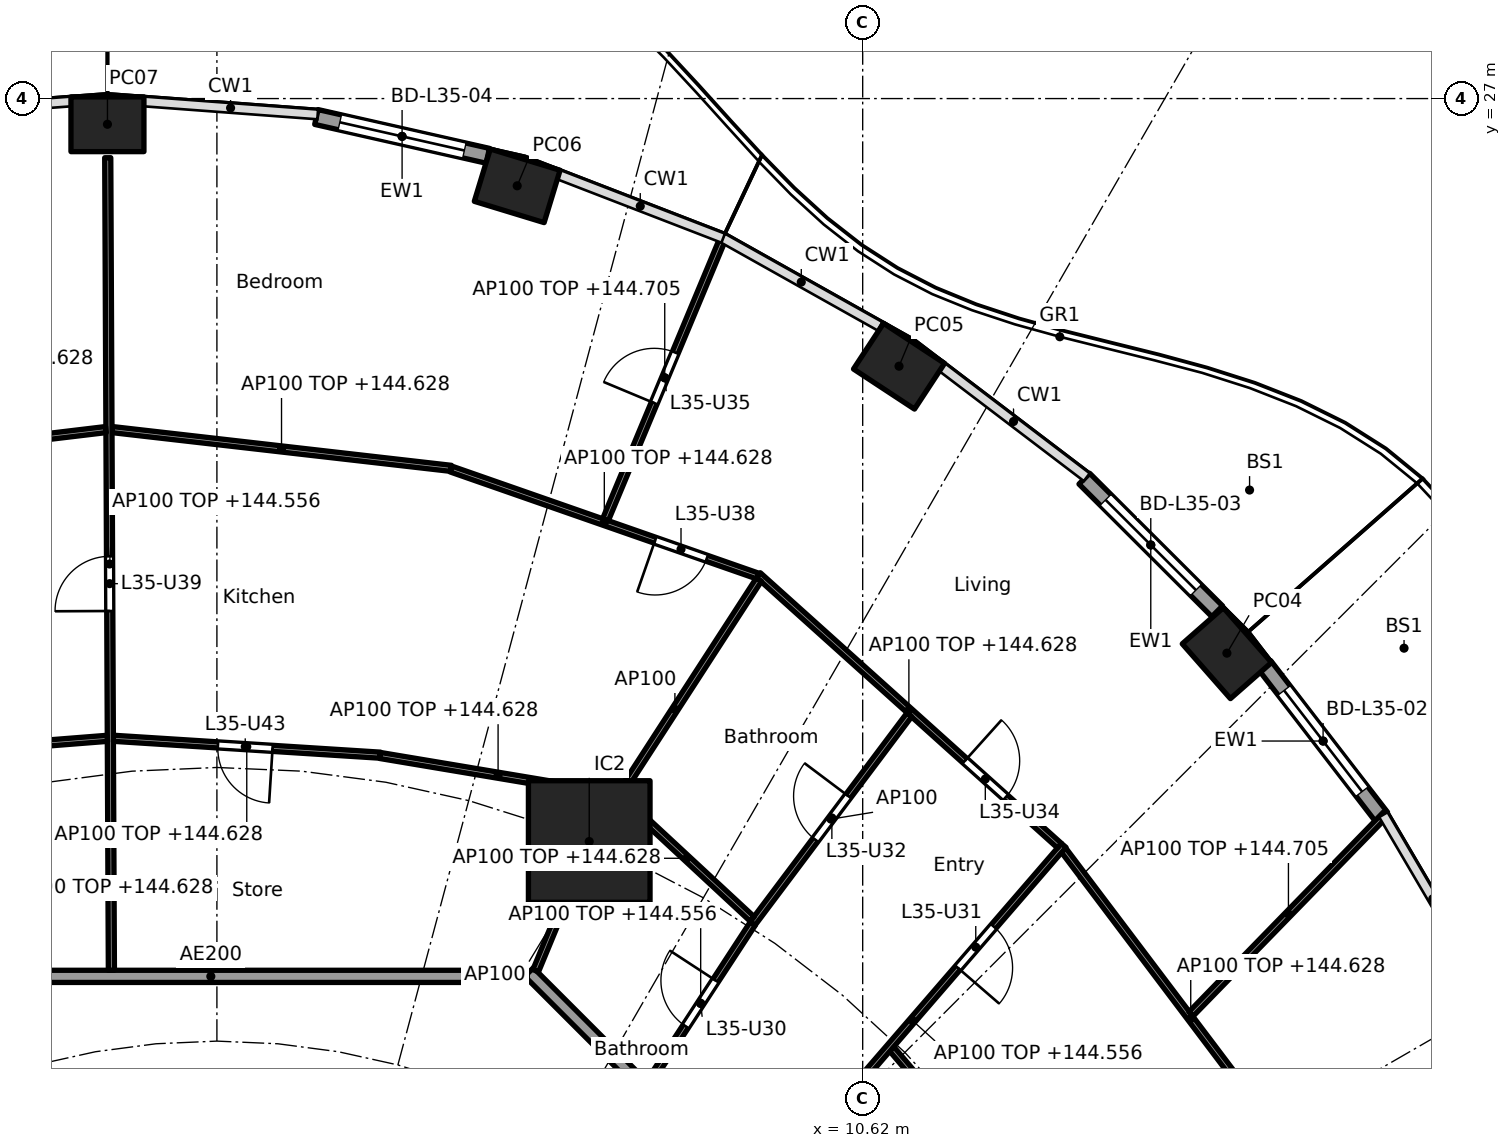
"""IFC4 building model, lengths in metres.
Left out: names, types, materials, properties, quantities, classifications, styles, units other than length and angle.
Written with IfcOpenShell. Run it as: python <this file> out.ifc"""

import sys

from ifc_helpers import new_model, si_unit, direction, frame, frame_2d, origin, origin_2d, place, context, subcontext, project, spatial, rectangle, hollow_rectangle, extrude, element, fill, save


model = new_model("IFC4")
c1 = context("Model", 3, precision=1e-05, world=origin(), true_north=direction((0.0, 1.0)))
c2 = subcontext(c1, "Body", "Model", "MODEL_VIEW")
j1 = project(units=[si_unit("LENGTHUNIT", "METRE"), si_unit("PLANEANGLEUNIT", "RADIAN")], contexts=[c1])
p1 = place(None, origin())
s1 = spatial("IfcSite", under=j1, at=p1, CompositionType="ELEMENT")
p2 = place(p1, origin())
s2 = spatial("IfcBuilding", under=s1, at=p2, CompositionType="ELEMENT")
p3 = place(p2, frame((0.0, 0.0, 141.8)))
s3 = spatial("IfcBuildingStorey", under=s2, at=p3, CompositionType="ELEMENT", Elevation=141.8)
for number, where, z_axis, x_axis in (
    (1, (16.61, 17.88, 0.0), (0.0, 0.0, 1.0), (-0.66, 0.751, 0.0)),
    (2, (11.218, 22.599, 0.0), (0.0, 0.0, 1.0), (-0.836, 0.549, 0.0)),
    (3, (4.938, 25.565, 0.0), (0.0, 0.0, 1.0), (-0.957, 0.292, 0.0)),
    (4, (-1.8, 26.577, 0.0), (0.0, 0.0, 1.0), (-1.0, 0.0, 0.0)),
):
    element("IfcColumn", number, at=place(p3, frame(where, z_axis=z_axis, x_axis=x_axis)), inside=s3, PredefinedType="COLUMN", context=c2, shape_type="SweptSolid", body=[
        extrude(hollow_rectangle(XDim=1.2, YDim=0.9, WallThickness=0.04, at=origin_2d()), origin(), (0.0, 0.0, 1.0), 3.7),
    ])
p4 = place(p3, frame((6.123, 14.782, 0.0), z_axis=(0.0, 0.0, 1.0), x_axis=(1.0, 0.0, 0.0)))
e5 = element("IfcColumn", 5, at=p4, inside=s3, PredefinedType="COLUMN", context=c2, shape_type="SweptSolid", body=[
    extrude(rectangle(XDim=2.0, YDim=2.0, at=origin_2d()), origin(), (0.0, 0.0, 1.0), 3.7),
])
p5 = place(p3, frame((17.23, 17.682, 0.0), z_axis=(0.0, 0.0, 1.0), x_axis=(0.610429847179, -0.792070326217, 0.0)))
e6 = element("IfcWall", 6, at=p5, inside=s3, PredefinedType="SOLIDWALL", context=c2, shape_type="SweptSolid", body=[
    extrude(rectangle(XDim=3.149, YDim=0.25, at=frame_2d((1.575, 0.0))), origin(), (0.0, 0.0, 1.0), 3.44),
])
p6 = place(p5, frame((0.525, 0.0, 0.0)))
e7 = element("IfcOpeningElement", 7, at=p6, cuts=e6, PredefinedType="OPENING", context=c2, shape_type="SweptSolid", body=[
    extrude(rectangle(XDim=2.1, YDim=2.4, at=frame_2d((1.05, 1.2))), frame((0.0, 0.135, 0.0), z_axis=(0.0, -1.0, 0.0), x_axis=(1.0, 0.0, 0.0)), (0.0, 0.0, 1.0), 0.27),
])
p7 = place(p3, frame((14.265, 20.749, 0.0), z_axis=(0.0, 0.0, 1.0), x_axis=(0.70789728551, -0.706315392135, 0.0)))
e8 = element("IfcWall", 8, at=p7, inside=s3, PredefinedType="SOLIDWALL", context=c2, shape_type="SweptSolid", body=[
    extrude(rectangle(XDim=3.087, YDim=0.25, at=frame_2d((1.543, 0.0))), origin(), (0.0, 0.0, 1.0), 3.44),
])
p8 = place(p7, frame((0.493, 0.0, 0.0)))
e9 = element("IfcOpeningElement", 9, at=p8, cuts=e8, PredefinedType="OPENING", context=c2, shape_type="SweptSolid", body=[
    extrude(rectangle(XDim=2.1, YDim=2.4, at=frame_2d((1.05, 1.2))), frame((0.0, 0.135, 0.0), z_axis=(0.0, -1.0, 0.0), x_axis=(1.0, 0.0, 0.0)), (0.0, 0.0, 1.0), 0.27),
])
p9 = place(p3, frame((1.636, 26.697, 0.0), z_axis=(0.0, 0.0, 1.0), x_axis=(0.975339035722, -0.220711951186, 0.0)))
e10 = element("IfcWall", 10, at=p9, inside=s3, PredefinedType="SOLIDWALL", context=c2, shape_type="SweptSolid", body=[
    extrude(rectangle(XDim=2.89, YDim=0.25, at=frame_2d((1.445, 0.0))), origin(), (0.0, 0.0, 1.0), 3.44),
])
p10 = place(p9, frame((0.395, 0.0, 0.0)))
e11 = element("IfcOpeningElement", 11, at=p10, cuts=e10, PredefinedType="OPENING", context=c2, shape_type="SweptSolid", body=[
    extrude(rectangle(XDim=2.1, YDim=2.4, at=frame_2d((1.05, 1.2))), frame((0.0, 0.135, 0.0), z_axis=(0.0, -1.0, 0.0), x_axis=(1.0, 0.0, 0.0)), (0.0, 0.0, 1.0), 0.27),
])
p11 = place(p3, frame((12.635, 5.134, 0.0), z_axis=(0.0, 0.0, 1.0), x_axis=(-0.707106781187, 0.707106781187, 0.0)))
e12 = element("IfcWall", 12, at=p11, inside=s3, PredefinedType="PARTITIONING", context=c2, shape_type="SweptSolid", body=[
    extrude(rectangle(XDim=10.609, YDim=0.2, at=frame_2d((5.305, 0.0))), origin(), (0.0, 0.0, 1.0), 3.44),
])
p12 = place(p11, frame((6.106, 0.0, 0.0)))
e13 = element("IfcOpeningElement", 13, at=p12, cuts=e12, PredefinedType="OPENING", context=c2, shape_type="SweptSolid", body=[
    extrude(rectangle(XDim=1.0, YDim=2.1, at=frame_2d((0.5, 1.05))), frame((0.0, 0.11, 0.0), z_axis=(0.0, -1.0, 0.0), x_axis=(1.0, 0.0, 0.0)), (0.0, 0.0, 1.0), 0.22),
])
p13 = place(p3, frame((5.104, 12.565, 0.0), z_axis=(0.0, 0.0, 1.0), x_axis=(-1.0, 0.0, 0.0)))
e14 = element("IfcWall", 14, at=p13, inside=s3, PredefinedType="PARTITIONING", context=c2, shape_type="SweptSolid", body=[
    extrude(rectangle(XDim=10.409, YDim=0.2, at=frame_2d((5.205, 0.0))), origin(), (0.0, 0.0, 1.0), 3.44),
])
p14 = place(p3, frame((15.25, 6.483, 0.0), z_axis=(0.0, 0.0, 1.0), x_axis=(-0.647379829894, 0.762167537912, 0.0)))
e15 = element("IfcWall", 15, at=p14, inside=s3, PredefinedType="PARTITIONING", context=c2, shape_type="SweptSolid", body=[
    extrude(rectangle(XDim=6.413, YDim=0.1, at=frame_2d((3.206, 0.0))), origin(), (0.0, 0.0, 1.0), 2.828),
])
p15 = place(p3, frame((18.106, 9.098, 0.0), z_axis=(0.0, 0.0, 1.0), x_axis=(-0.602393803621, 0.798199038686, 0.0)))
e16 = element("IfcWall", 16, at=p15, inside=s3, PredefinedType="PARTITIONING", context=c2, shape_type="SweptSolid", body=[
    extrude(rectangle(XDim=6.944, YDim=0.1, at=frame_2d((3.472, 0.0))), origin(), (0.0, 0.0, 1.0), 2.828),
])
p16 = place(p3, frame((16.02, 11.946, 0.0), z_axis=(0.0, 0.0, 1.0), x_axis=(0.697741638446, 0.71634949988, 0.0)))
e17 = element("IfcWall", 17, at=p16, inside=s3, PredefinedType="PARTITIONING", context=c2, shape_type="SweptSolid", body=[
    extrude(rectangle(XDim=4.592, YDim=0.1, at=frame_2d((2.296, 0.0))), origin(), (0.0, 0.0, 1.0), 2.905),
])
p17 = place(p3, frame((8.95, 8.96, 0.0), z_axis=(0.0, 0.0, 1.0), x_axis=(0.653829477183, 0.756641932995, 0.0)))
e18 = element("IfcWall", 18, at=p17, inside=s3, PredefinedType="PARTITIONING", context=c2, shape_type="SweptSolid", body=[
    extrude(rectangle(XDim=7.611, YDim=0.1, at=frame_2d((3.805, 0.0))), origin(), (0.0, 0.0, 1.0), 2.756),
])
p18 = place(p17, frame((1.168, 0.0, 0.0)))
e19 = element("IfcOpeningElement", 19, at=p18, cuts=e18, PredefinedType="OPENING", context=c2, shape_type="SweptSolid", body=[
    extrude(rectangle(XDim=0.9, YDim=2.1, at=frame_2d((0.45, 1.05))), frame((0.0, 0.06, 0.0), z_axis=(0.0, -1.0, 0.0), x_axis=(1.0, 0.0, 0.0)), (0.0, 0.0, 1.0), 0.12),
])
p19 = place(p17, frame((4.948, 0.0, 0.0)))
e20 = element("IfcOpeningElement", 20, at=p19, cuts=e18, PredefinedType="OPENING", context=c2, shape_type="SweptSolid", body=[
    extrude(rectangle(XDim=0.9, YDim=2.1, at=frame_2d((0.45, 1.05))), frame((0.0, 0.06, 0.0), z_axis=(0.0, -1.0, 0.0), x_axis=(1.0, 0.0, 0.0)), (0.0, 0.0, 1.0), 0.12),
])
p20 = place(p3, frame((13.856, 14.714, 0.0), z_axis=(0.0, 0.0, 1.0), x_axis=(-0.743793479211, 0.668409500444, 0.0)))
e21 = element("IfcWall", 21, at=p20, inside=s3, PredefinedType="PARTITIONING", context=c2, shape_type="SweptSolid", body=[
    extrude(rectangle(XDim=6.659, YDim=0.1, at=frame_2d((3.329, 0.0))), origin(), (0.0, 0.0, 1.0), 2.828),
])
p21 = place(p20, frame((1.19, 0.0, 0.0)))
e22 = element("IfcOpeningElement", 22, at=p21, cuts=e21, PredefinedType="OPENING", context=c2, shape_type="SweptSolid", body=[
    extrude(rectangle(XDim=0.9, YDim=2.1, at=frame_2d((0.45, 1.05))), frame((0.0, 0.06, 0.0), z_axis=(0.0, -1.0, 0.0), x_axis=(1.0, 0.0, 0.0)), (0.0, 0.0, 1.0), 0.12),
])
p22 = place(p3, frame((7.099, 10.808, 0.0), z_axis=(0.0, 0.0, 1.0), x_axis=(0.546709757921, 0.837322184463, 0.0)))
e23 = element("IfcWall", 23, at=p22, inside=s3, PredefinedType="PARTITIONING", context=c2, shape_type="SweptSolid", body=[
    extrude(rectangle(XDim=3.134, YDim=0.1, at=frame_2d((1.567, 0.0))), origin(), (0.0, 0.0, 1.0), 2.756),
])
p23 = place(p22, frame((1.117, 0.0, 0.0)))
e24 = element("IfcOpeningElement", 24, at=p23, cuts=e23, PredefinedType="OPENING", context=c2, shape_type="SweptSolid", body=[
    extrude(rectangle(XDim=0.9, YDim=2.1, at=frame_2d((0.45, 1.05))), frame((0.0, 0.06, 0.0), z_axis=(0.0, -1.0, 0.0), x_axis=(1.0, 0.0, 0.0)), (0.0, 0.0, 1.0), 0.12),
])
p24 = place(p3, frame((8.81, 13.434, 0.0), z_axis=(0.0, 0.0, 1.0), x_axis=(0.600491337497, 0.799631261014, 0.0)))
e25 = element("IfcWall", 25, at=p24, inside=s3, PredefinedType="PARTITIONING", context=c2, shape_type="SweptSolid", body=[
    extrude(rectangle(XDim=4.292, YDim=0.1, at=frame_2d((2.146, 0.0))), origin(), (0.0, 0.0, 1.0), 3.44),
])
p25 = place(p24, frame((1.721, 0.0, 0.0)))
e26 = element("IfcOpeningElement", 26, at=p25, cuts=e25, PredefinedType="OPENING", context=c2, shape_type="SweptSolid", body=[
    extrude(rectangle(XDim=0.9, YDim=2.1, at=frame_2d((0.45, 1.05))), frame((0.0, 0.06, 0.0), z_axis=(0.0, -1.0, 0.0), x_axis=(1.0, 0.0, 0.0)), (0.0, 0.0, 1.0), 0.12),
])
p26 = place(p3, frame((8.803, 13.508, 0.0), z_axis=(0.0, 0.0, 1.0), x_axis=(-0.733130973758, 0.680087476224, 0.0)))
e27 = element("IfcWall", 27, at=p26, inside=s3, PredefinedType="PARTITIONING", context=c2, shape_type="SweptSolid", body=[
    extrude(rectangle(XDim=2.937, YDim=0.1, at=frame_2d((1.468, 0.0))), origin(), (0.0, 0.0, 1.0), 2.828),
])
p27 = place(p3, frame((5.243, 12.657, 0.0), z_axis=(0.0, 0.0, 1.0), x_axis=(0.382703272338, 0.923871314276, 0.0)))
e28 = element("IfcWall", 28, at=p27, inside=s3, PredefinedType="PARTITIONING", context=c2, shape_type="SweptSolid", body=[
    extrude(rectangle(XDim=2.249, YDim=0.1, at=frame_2d((1.125, 0.0))), origin(), (0.0, 0.0, 1.0), 3.44),
])
p28 = place(p3, frame((6.15, 14.824, 0.0), z_axis=(0.0, 0.0, 1.0), x_axis=(0.543711280797, 0.839272329542, 0.0)))
e29 = element("IfcWall", 29, at=p28, inside=s3, PredefinedType="PARTITIONING", context=c2, shape_type="SweptSolid", body=[
    extrude(rectangle(XDim=5.083, YDim=0.1, at=frame_2d((2.541, 0.0))), origin(), (0.0, 0.0, 1.0), 3.44),
])
p29 = place(p3, frame((6.564, 15.547, 0.0), z_axis=(0.0, 0.0, 1.0), x_axis=(-0.986269521186, 0.165143669511, 0.0)))
e30 = element("IfcWall", 30, at=p29, inside=s3, PredefinedType="PARTITIONING", context=c2, shape_type="SweptSolid", body=[
    extrude(rectangle(XDim=3.934, YDim=0.1, at=frame_2d((1.967, 0.0))), origin(), (0.0, 0.0, 1.0), 2.828),
])
p30 = place(p3, frame((8.894, 19.148, 0.0), z_axis=(0.0, 0.0, 1.0), x_axis=(-0.944182005381, 0.329424256414, 0.0)))
e31 = element("IfcWall", 31, at=p30, inside=s3, PredefinedType="PARTITIONING", context=c2, shape_type="SweptSolid", body=[
    extrude(rectangle(XDim=5.344, YDim=0.1, at=frame_2d((2.672, 0.0))), origin(), (0.0, 0.0, 1.0), 2.828),
])
p31 = place(p30, frame((0.886, 0.0, 0.0)))
e32 = element("IfcOpeningElement", 32, at=p31, cuts=e31, PredefinedType="OPENING", context=c2, shape_type="SweptSolid", body=[
    extrude(rectangle(XDim=0.9, YDim=2.1, at=frame_2d((0.45, 1.05))), frame((0.0, 0.06, 0.0), z_axis=(0.0, -1.0, 0.0), x_axis=(1.0, 0.0, 0.0)), (0.0, 0.0, 1.0), 0.12),
])
p32 = place(p3, frame((6.39, 20.074, 0.0), z_axis=(0.0, 0.0, 1.0), x_axis=(0.385304133029, 0.922789642915, 0.0)))
e33 = element("IfcWall", 33, at=p32, inside=s3, PredefinedType="PARTITIONING", context=c2, shape_type="SweptSolid", body=[
    extrude(rectangle(XDim=5.058, YDim=0.1, at=frame_2d((2.529, 0.0))), origin(), (0.0, 0.0, 1.0), 2.905),
])
p33 = place(p32, frame((2.079, 0.0, 0.0)))
e34 = element("IfcOpeningElement", 34, at=p33, cuts=e33, PredefinedType="OPENING", context=c2, shape_type="SweptSolid", body=[
    extrude(rectangle(XDim=0.9, YDim=2.1, at=frame_2d((0.45, 1.05))), frame((0.0, 0.06, 0.0), z_axis=(0.0, -1.0, 0.0), x_axis=(1.0, 0.0, 0.0)), (0.0, 0.0, 1.0), 0.12),
])
p34 = place(p3, frame((2.685, 16.202, 0.0), z_axis=(0.0, 0.0, 1.0), x_axis=(-0.998000808042, 0.063201164138, 0.0)))
e35 = element("IfcWall", 35, at=p34, inside=s3, PredefinedType="PARTITIONING", context=c2, shape_type="SweptSolid", body=[
    extrude(rectangle(XDim=4.396, YDim=0.1, at=frame_2d((2.198, 0.0))), origin(), (0.0, 0.0, 1.0), 2.828),
])
p35 = place(p34, frame((1.773, 0.0, 0.0)))
e36 = element("IfcOpeningElement", 36, at=p35, cuts=e35, PredefinedType="OPENING", context=c2, shape_type="SweptSolid", body=[
    extrude(rectangle(XDim=0.9, YDim=2.1, at=frame_2d((0.45, 1.05))), frame((0.0, 0.06, 0.0), z_axis=(0.0, -1.0, 0.0), x_axis=(1.0, 0.0, 0.0)), (0.0, 0.0, 1.0), 0.12),
])
p36 = place(p3, frame((3.851, 20.919, 0.0), z_axis=(0.0, 0.0, 1.0), x_axis=(-0.993519908136, 0.11365822512, 0.0)))
e37 = element("IfcWall", 37, at=p36, inside=s3, PredefinedType="PARTITIONING", context=c2, shape_type="SweptSolid", body=[
    extrude(rectangle(XDim=5.613, YDim=0.1, at=frame_2d((2.806, 0.0))), origin(), (0.0, 0.0, 1.0), 2.828),
])
p37 = place(p3, frame((-1.735, 12.665, 0.0), z_axis=(0.0, 0.0, 1.0), x_axis=(-0.004494500855, 0.99998989968, 0.0)))
e38 = element("IfcWall", 38, at=p37, inside=s3, PredefinedType="PARTITIONING", context=c2, shape_type="SweptSolid", body=[
    extrude(rectangle(XDim=13.363, YDim=0.1, at=frame_2d((6.681, 0.0))), origin(), (0.0, 0.0, 1.0), 2.756),
])
p38 = place(p37, frame((5.908, 0.0, 0.0)))
e39 = element("IfcOpeningElement", 39, at=p38, cuts=e38, PredefinedType="OPENING", context=c2, shape_type="SweptSolid", body=[
    extrude(rectangle(XDim=0.9, YDim=2.1, at=frame_2d((0.45, 1.05))), frame((0.0, 0.06, 0.0), z_axis=(0.0, -1.0, 0.0), x_axis=(1.0, 0.0, 0.0)), (0.0, 0.0, 1.0), 0.12),
])
p39 = place(p3, frame((-1.802, 16.479, 0.0), z_axis=(0.0, 0.0, 1.0), x_axis=(-0.996907698294, -0.078581429625, 0.0)))
e40 = element("IfcWall", 40, at=p39, inside=s3, PredefinedType="PARTITIONING", context=c2, shape_type="SweptSolid", body=[
    extrude(rectangle(XDim=4.536, YDim=0.1, at=frame_2d((2.268, 0.0))), origin(), (0.0, 0.0, 1.0), 2.828),
])
p40 = place(p39, frame((1.818, 0.0, 0.0)))
e41 = element("IfcOpeningElement", 41, at=p40, cuts=e40, PredefinedType="OPENING", context=c2, shape_type="SweptSolid", body=[
    extrude(rectangle(XDim=0.9, YDim=2.1, at=frame_2d((0.45, 1.05))), frame((0.0, 0.06, 0.0), z_axis=(0.0, -1.0, 0.0), x_axis=(1.0, 0.0, 0.0)), (0.0, 0.0, 1.0), 0.12),
])
p41 = place(p3, frame((-1.825, 21.557, 0.0), z_axis=(0.0, 0.0, 1.0), x_axis=(-0.992915053711, -0.11882632753, 0.0)))
e42 = element("IfcWall", 42, at=p41, inside=s3, PredefinedType="PARTITIONING", context=c2, shape_type="SweptSolid", body=[
    extrude(rectangle(XDim=5.615, YDim=0.1, at=frame_2d((2.808, 0.0))), origin(), (0.0, 0.0, 1.0), 2.828),
])
p42 = place(p41, frame((2.358, 0.0, 0.0)))
e43 = element("IfcOpeningElement", 43, at=p42, cuts=e42, PredefinedType="OPENING", context=c2, shape_type="SweptSolid", body=[
    extrude(rectangle(XDim=0.9, YDim=2.1, at=frame_2d((0.45, 1.05))), frame((0.0, 0.06, 0.0), z_axis=(0.0, -1.0, 0.0), x_axis=(1.0, 0.0, 0.0)), (0.0, 0.0, 1.0), 0.12),
])
p43 = place(p6, origin())
e44 = element("IfcDoor", 44, at=p43, inside=s3, OperationType="SLIDING_TO_LEFT", PredefinedType="DOOR", context=c2, shape_type="SweptSolid", body=[
    extrude(rectangle(XDim=2.1, YDim=2.4, at=frame_2d((1.05, 1.2))), frame((0.0, 0.025, 0.0), z_axis=(0.0, -1.0, 0.0), x_axis=(1.0, 0.0, 0.0)), (0.0, 0.0, 1.0), 0.05),
])
fill(e7, e44)
p44 = place(p8, origin())
e45 = element("IfcDoor", 45, at=p44, inside=s3, OperationType="SLIDING_TO_LEFT", PredefinedType="DOOR", context=c2, shape_type="SweptSolid", body=[
    extrude(rectangle(XDim=2.1, YDim=2.4, at=frame_2d((1.05, 1.2))), frame((0.0, 0.025, 0.0), z_axis=(0.0, -1.0, 0.0), x_axis=(1.0, 0.0, 0.0)), (0.0, 0.0, 1.0), 0.05),
])
fill(e9, e45)
p45 = place(p10, origin())
e46 = element("IfcDoor", 46, at=p45, inside=s3, OperationType="SLIDING_TO_LEFT", PredefinedType="DOOR", context=c2, shape_type="SweptSolid", body=[
    extrude(rectangle(XDim=2.1, YDim=2.4, at=frame_2d((1.05, 1.2))), frame((0.0, 0.025, 0.0), z_axis=(0.0, -1.0, 0.0), x_axis=(1.0, 0.0, 0.0)), (0.0, 0.0, 1.0), 0.05),
])
fill(e11, e46)
p46 = place(p23, origin())
e47 = element("IfcDoor", 47, at=p46, inside=s3, OperationType="SINGLE_SWING_RIGHT", PredefinedType="DOOR", context=c2, shape_type="SweptSolid", body=[
    extrude(rectangle(XDim=0.9, YDim=2.1, at=frame_2d((0.45, 1.05))), frame((0.0, 0.025, 0.0), z_axis=(0.0, -1.0, 0.0), x_axis=(1.0, 0.0, 0.0)), (0.0, 0.0, 1.0), 0.05),
])
fill(e24, e47)
p47 = place(p19, frame((0.9, 0.0, 0.0), x_axis=(-1.0, 0.0, 0.0)))
e48 = element("IfcDoor", 48, at=p47, inside=s3, OperationType="SINGLE_SWING_RIGHT", PredefinedType="DOOR", context=c2, shape_type="SweptSolid", body=[
    extrude(rectangle(XDim=0.9, YDim=2.1, at=frame_2d((0.45, 1.05))), frame((0.0, 0.025, 0.0), z_axis=(0.0, -1.0, 0.0), x_axis=(1.0, 0.0, 0.0)), (0.0, 0.0, 1.0), 0.05),
])
fill(e20, e48)
p48 = place(p25, origin())
e49 = element("IfcDoor", 49, at=p48, inside=s3, OperationType="SINGLE_SWING_RIGHT", PredefinedType="DOOR", context=c2, shape_type="SweptSolid", body=[
    extrude(rectangle(XDim=0.9, YDim=2.1, at=frame_2d((0.45, 1.05))), frame((0.0, 0.025, 0.0), z_axis=(0.0, -1.0, 0.0), x_axis=(1.0, 0.0, 0.0)), (0.0, 0.0, 1.0), 0.05),
])
fill(e26, e49)
p49 = place(p21, frame((0.9, 0.0, 0.0), x_axis=(-1.0, 0.0, 0.0)))
e50 = element("IfcDoor", 50, at=p49, inside=s3, OperationType="SINGLE_SWING_LEFT", PredefinedType="DOOR", context=c2, shape_type="SweptSolid", body=[
    extrude(rectangle(XDim=0.9, YDim=2.1, at=frame_2d((0.45, 1.05))), frame((0.0, 0.025, 0.0), z_axis=(0.0, -1.0, 0.0), x_axis=(1.0, 0.0, 0.0)), (0.0, 0.0, 1.0), 0.05),
])
fill(e22, e50)
p50 = place(p33, origin())
e51 = element("IfcDoor", 51, at=p50, inside=s3, OperationType="SINGLE_SWING_LEFT", PredefinedType="DOOR", context=c2, shape_type="SweptSolid", body=[
    extrude(rectangle(XDim=0.9, YDim=2.1, at=frame_2d((0.45, 1.05))), frame((0.0, 0.025, 0.0), z_axis=(0.0, -1.0, 0.0), x_axis=(1.0, 0.0, 0.0)), (0.0, 0.0, 1.0), 0.05),
])
fill(e34, e51)
p51 = place(p31, origin())
e52 = element("IfcDoor", 52, at=p51, inside=s3, OperationType="SINGLE_SWING_RIGHT", PredefinedType="DOOR", context=c2, shape_type="SweptSolid", body=[
    extrude(rectangle(XDim=0.9, YDim=2.1, at=frame_2d((0.45, 1.05))), frame((0.0, 0.025, 0.0), z_axis=(0.0, -1.0, 0.0), x_axis=(1.0, 0.0, 0.0)), (0.0, 0.0, 1.0), 0.05),
])
fill(e32, e52)
p52 = place(p38, origin())
e53 = element("IfcDoor", 53, at=p52, inside=s3, OperationType="SINGLE_SWING_LEFT", PredefinedType="DOOR", context=c2, shape_type="SweptSolid", body=[
    extrude(rectangle(XDim=0.9, YDim=2.1, at=frame_2d((0.45, 1.05))), frame((0.0, 0.025, 0.0), z_axis=(0.0, -1.0, 0.0), x_axis=(1.0, 0.0, 0.0)), (0.0, 0.0, 1.0), 0.05),
])
fill(e39, e53)
p53 = place(p35, origin())
e54 = element("IfcDoor", 54, at=p53, inside=s3, OperationType="SINGLE_SWING_LEFT", PredefinedType="DOOR", context=c2, shape_type="SweptSolid", body=[
    extrude(rectangle(XDim=0.9, YDim=2.1, at=frame_2d((0.45, 1.05))), frame((0.0, 0.025, 0.0), z_axis=(0.0, -1.0, 0.0), x_axis=(1.0, 0.0, 0.0)), (0.0, 0.0, 1.0), 0.05),
])
fill(e36, e54)
save(model, sys.argv[1])
